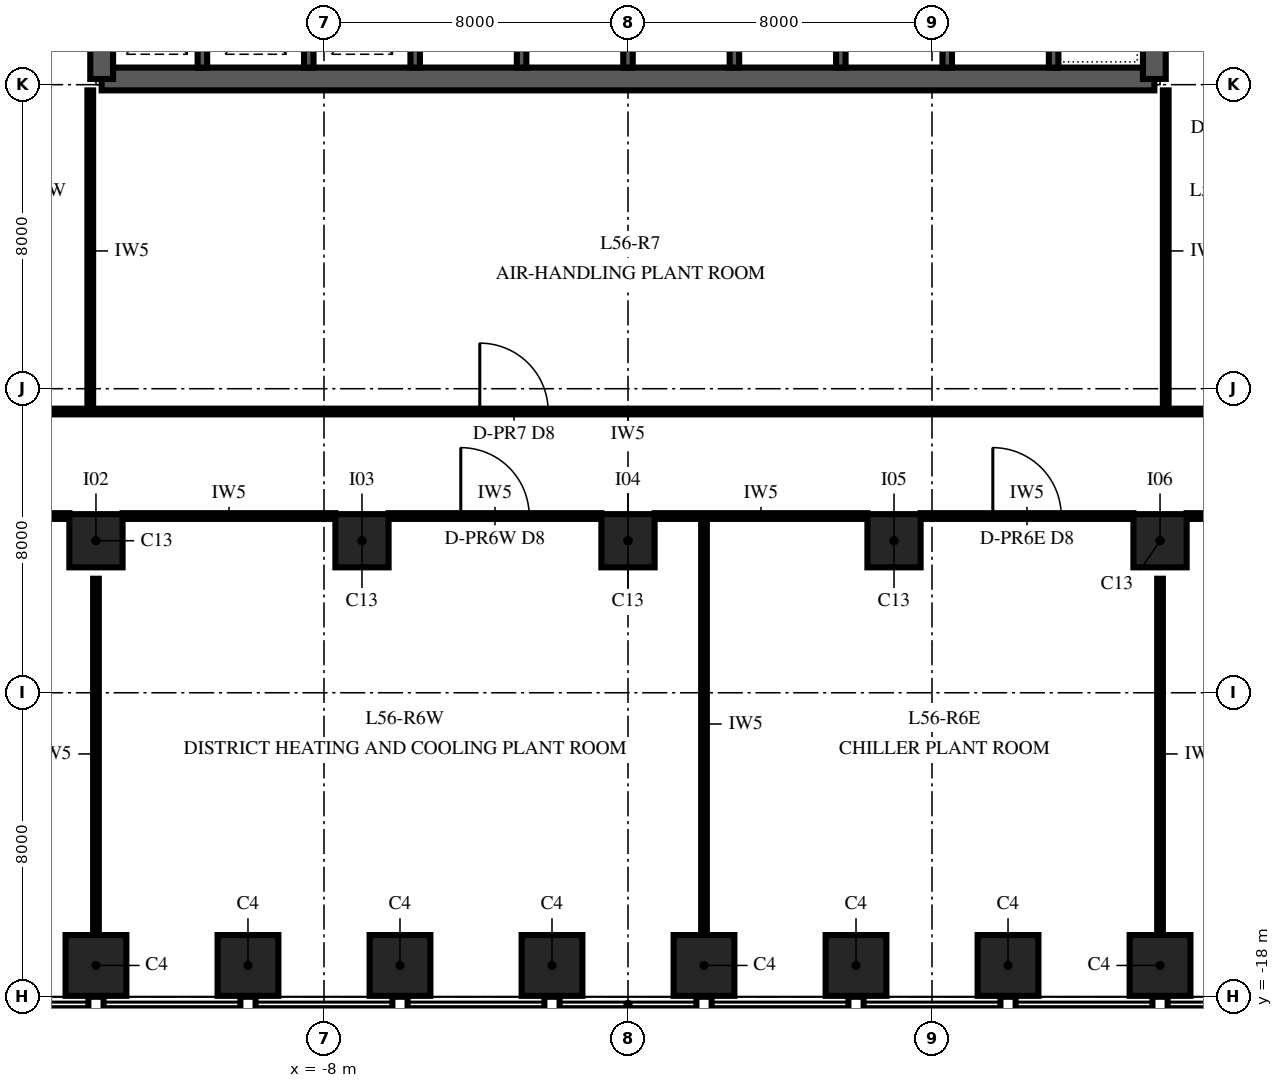
"""IFC4 building model, lengths in metres.
Left out: names, types, materials, properties, quantities, classifications, styles, units other than length and angle.
Written with IfcOpenShell. Run it as: python <this file> out.ifc"""

import sys

from ifc_helpers import new_model, si_unit, direction, frame, frame_2d, origin, origin_2d, place, context, subcontext, project, spatial, polyline, rectangle, outline, extrude, element, fill, save


model = new_model("IFC4")
c1 = context("Model", 3, precision=1e-05, world=origin(), true_north=direction((0.0, 1.0)))
c2 = subcontext(c1, "Body", "Model", "MODEL_VIEW")
j1 = project(units=[si_unit("LENGTHUNIT", "METRE"), si_unit("PLANEANGLEUNIT", "RADIAN")], contexts=[c1])
p1 = place(None, origin())
s1 = spatial("IfcSite", under=j1, at=p1, CompositionType="ELEMENT")
p2 = place(p1, origin())
s2 = spatial("IfcBuilding", under=s1, at=p2, CompositionType="ELEMENT")
p3 = place(p2, frame((0.0, 0.0, 242.0)))
s3 = spatial("IfcBuildingStorey", under=s2, at=p3, CompositionType="ELEMENT", Elevation=242.0)
for number, where, z_axis, x_axis in (
    (1, (-14.0, -17.175, 0.0), (0.0, 0.0, 1.0), (1.0, 0.0, 0.0)),
    (2, (-10.0, -17.175, 0.0), (0.0, 0.0, 1.0), (1.0, 0.0, 0.0)),
    (3, (-6.0, -17.175, 0.0), (0.0, 0.0, 1.0), (1.0, 0.0, 0.0)),
    (4, (-2.0, -17.175, 0.0), (0.0, 0.0, 1.0), (1.0, 0.0, 0.0)),
    (5, (2.0, -17.175, 0.0), (0.0, 0.0, 1.0), (1.0, 0.0, 0.0)),
    (6, (6.0, -17.175, 0.0), (0.0, 0.0, 1.0), (1.0, 0.0, 0.0)),
    (7, (10.0, -17.175, 0.0), (0.0, 0.0, 1.0), (1.0, 0.0, 0.0)),
    (8, (14.0, -17.175, 0.0), (0.0, 0.0, 1.0), (1.0, 0.0, 0.0)),
):
    element("IfcColumn", number, at=place(p3, frame(where, z_axis=z_axis, x_axis=x_axis)), inside=s3, PredefinedType="COLUMN", context=c2, shape_type="SweptSolid", body=[
        extrude(rectangle(XDim=1.6, YDim=1.6, at=origin_2d()), origin(), (0.0, 0.0, 1.0), 6.0),
    ])
for number, where, z_axis, x_axis in (
    (9, (-14.0, -6.0, 0.0), (0.0, 0.0, 1.0), (1.0, 0.0, 0.0)),
    (10, (-7.0, -6.0, 0.0), (0.0, 0.0, 1.0), (1.0, 0.0, 0.0)),
    (11, (0.0, -6.0, 0.0), (0.0, 0.0, 1.0), (1.0, 0.0, 0.0)),
    (12, (7.0, -6.0, 0.0), (0.0, 0.0, 1.0), (1.0, 0.0, 0.0)),
    (13, (14.0, -6.0, 0.0), (0.0, 0.0, 1.0), (1.0, 0.0, 0.0)),
):
    element("IfcColumn", number, at=place(p3, frame(where, z_axis=z_axis, x_axis=x_axis)), inside=s3, PredefinedType="COLUMN", context=c2, shape_type="SweptSolid", body=[
        extrude(rectangle(XDim=1.4, YDim=1.4, at=origin_2d()), origin(), (0.0, 0.0, 1.0), 6.0),
    ])
p4 = place(p3, frame((-13.85, 6.15, 0.0), z_axis=(0.0, 0.0, 1.0), x_axis=(1.0, 0.0, 0.0)))
e14 = element("IfcWall", 14, at=p4, inside=s3, PredefinedType="SHEAR", context=c2, shape_type="SweptSolid", body=[
    extrude(rectangle(XDim=27.7, YDim=0.6, at=frame_2d((13.85, 0.0))), origin(), (0.0, 0.0, 1.0), 6.0),
])
for number, where, z_axis, x_axis in (
    (15, (13.85, 6.15, 0.0), (0.0, 0.0, 1.0), (0.0, 1.0, 0.0)),
    (16, (-13.85, 23.85, 0.0), (0.0, 0.0, 1.0), (0.0, -1.0, 0.0)),
):
    element("IfcWall", number, at=place(p3, frame(where, z_axis=z_axis, x_axis=x_axis)), inside=s3, PredefinedType="SHEAR", context=c2, shape_type="SweptSolid", body=[
        extrude(outline(polyline([(0.0, -0.3), (17.7, -0.3), (17.7, 0.0), (17.4, 0.0), (17.4, 0.3), (0.3, 0.3), (0.3, 0.0), (0.0, 0.0), (0.0, -0.3)])), origin(), (0.0, 0.0, 1.0), 6.0),
    ])
for number, where, z_axis, x_axis in (
    (17, (-11.2, 6.45, 0.0), (0.0, 0.0, 1.0), (0.0, 1.0, 0.0)),
    (18, (-8.4, 6.45, 0.0), (0.0, 0.0, 1.0), (0.0, 1.0, 0.0)),
    (19, (-5.6, 6.45, 0.0), (0.0, 0.0, 1.0), (0.0, 1.0, 0.0)),
    (20, (-2.8, 6.45, 0.0), (0.0, 0.0, 1.0), (0.0, 1.0, 0.0)),
    (21, (0.0, 6.45, 0.0), (0.0, 0.0, 1.0), (0.0, 1.0, 0.0)),
    (22, (2.8, 6.45, 0.0), (0.0, 0.0, 1.0), (0.0, 1.0, 0.0)),
    (23, (5.6, 6.45, 0.0), (0.0, 0.0, 1.0), (0.0, 1.0, 0.0)),
    (24, (8.4, 6.45, 0.0), (0.0, 0.0, 1.0), (0.0, 1.0, 0.0)),
    (25, (11.2, 6.45, 0.0), (0.0, 0.0, 1.0), (0.0, 1.0, 0.0)),
):
    element("IfcWall", number, at=place(p3, frame(where, z_axis=z_axis, x_axis=x_axis)), inside=s3, PredefinedType="SHEAR", context=c2, shape_type="SweptSolid", body=[
        extrude(rectangle(XDim=2.825, YDim=0.25, at=frame_2d((1.413, 0.0))), origin(), (0.0, 0.0, 1.0), 6.0),
    ])
p5 = place(p3, frame((14.15, -2.6, 0.0), z_axis=(0.0, 0.0, 1.0), x_axis=(0.0, 1.0, 0.0)))
e26 = element("IfcWall", 26, at=p5, inside=s3, PredefinedType="PARTITIONING", context=c2, shape_type="SweptSolid", body=[
    extrude(rectangle(XDim=8.45, YDim=0.15, at=frame_2d((4.225, 0.0))), origin(), (0.0, 0.0, 1.0), 5.85),
])
p6 = place(p3, frame((14.0, -7.0, 0.0), z_axis=(0.0, 0.0, 1.0), x_axis=(0.0, -1.0, 0.0)))
e27 = element("IfcWall", 27, at=p6, inside=s3, PredefinedType="PARTITIONING", context=c2, shape_type="SweptSolid", body=[
    extrude(rectangle(XDim=9.22, YDim=0.15, at=frame_2d((4.61, 0.0))), origin(), (0.0, 0.0, 1.0), 5.25),
])
p7 = place(p3, frame((-14.15, -2.6, 0.0), z_axis=(0.0, 0.0, 1.0), x_axis=(0.0, 1.0, 0.0)))
e28 = element("IfcWall", 28, at=p7, inside=s3, PredefinedType="PARTITIONING", context=c2, shape_type="SweptSolid", body=[
    extrude(rectangle(XDim=8.45, YDim=0.15, at=frame_2d((4.225, 0.0))), origin(), (0.0, 0.0, 1.0), 5.85),
])
p8 = place(p3, frame((-14.0, -7.0, 0.0), z_axis=(0.0, 0.0, 1.0), x_axis=(0.0, -1.0, 0.0)))
e29 = element("IfcWall", 29, at=p8, inside=s3, PredefinedType="PARTITIONING", context=c2, shape_type="SweptSolid", body=[
    extrude(rectangle(XDim=9.22, YDim=0.15, at=frame_2d((4.61, 0.0))), origin(), (0.0, 0.0, 1.0), 5.25),
])
p9 = place(p3, frame((-20.3, -5.35, 0.0), z_axis=(0.0, 0.0, 1.0), x_axis=(1.0, 0.0, 0.0)))
e30 = element("IfcWall", 30, at=p9, inside=s3, PredefinedType="PARTITIONING", context=c2, shape_type="SweptSolid", body=[
    extrude(rectangle(XDim=5.6, YDim=0.15, at=frame_2d((2.8, 0.0))), origin(), (0.0, 0.0, 1.0), 5.85),
])
p10 = place(p9, frame((1.9, 0.0, 0.0)))
e31 = element("IfcOpeningElement", 31, at=p10, cuts=e30, PredefinedType="OPENING", context=c2, shape_type="SweptSolid", body=[
    extrude(rectangle(XDim=1.8, YDim=2.4, at=frame_2d((0.9, 1.2))), frame((0.0, 0.09, 0.0), z_axis=(0.0, -1.0, 0.0), x_axis=(1.0, 0.0, 0.0)), (0.0, 0.0, 1.0), 0.18),
])
p11 = place(p3, frame((-13.3, -5.35, 0.0), z_axis=(0.0, 0.0, 1.0), x_axis=(1.0, 0.0, 0.0)))
e32 = element("IfcWall", 32, at=p11, inside=s3, PredefinedType="PARTITIONING", context=c2, shape_type="SweptSolid", body=[
    extrude(rectangle(XDim=5.6, YDim=0.15, at=frame_2d((2.8, 0.0))), origin(), (0.0, 0.0, 1.0), 5.85),
])
p12 = place(p3, frame((-6.3, -5.35, 0.0), z_axis=(0.0, 0.0, 1.0), x_axis=(1.0, 0.0, 0.0)))
e33 = element("IfcWall", 33, at=p12, inside=s3, PredefinedType="PARTITIONING", context=c2, shape_type="SweptSolid", body=[
    extrude(rectangle(XDim=5.6, YDim=0.15, at=frame_2d((2.8, 0.0))), origin(), (0.0, 0.0, 1.0), 5.85),
])
p13 = place(p12, frame((1.9, 0.0, 0.0)))
e34 = element("IfcOpeningElement", 34, at=p13, cuts=e33, PredefinedType="OPENING", context=c2, shape_type="SweptSolid", body=[
    extrude(rectangle(XDim=1.8, YDim=2.4, at=frame_2d((0.9, 1.2))), frame((0.0, 0.09, 0.0), z_axis=(0.0, -1.0, 0.0), x_axis=(1.0, 0.0, 0.0)), (0.0, 0.0, 1.0), 0.18),
])
p14 = place(p3, frame((0.7, -5.35, 0.0), z_axis=(0.0, 0.0, 1.0), x_axis=(1.0, 0.0, 0.0)))
e35 = element("IfcWall", 35, at=p14, inside=s3, PredefinedType="PARTITIONING", context=c2, shape_type="SweptSolid", body=[
    extrude(rectangle(XDim=5.6, YDim=0.15, at=frame_2d((2.8, 0.0))), origin(), (0.0, 0.0, 1.0), 5.85),
])
p15 = place(p3, frame((7.7, -5.35, 0.0), z_axis=(0.0, 0.0, 1.0), x_axis=(1.0, 0.0, 0.0)))
e36 = element("IfcWall", 36, at=p15, inside=s3, PredefinedType="PARTITIONING", context=c2, shape_type="SweptSolid", body=[
    extrude(rectangle(XDim=5.6, YDim=0.15, at=frame_2d((2.8, 0.0))), origin(), (0.0, 0.0, 1.0), 5.85),
])
p16 = place(p15, frame((1.9, 0.0, 0.0)))
e37 = element("IfcOpeningElement", 37, at=p16, cuts=e36, PredefinedType="OPENING", context=c2, shape_type="SweptSolid", body=[
    extrude(rectangle(XDim=1.8, YDim=2.4, at=frame_2d((0.9, 1.2))), frame((0.0, 0.09, 0.0), z_axis=(0.0, -1.0, 0.0), x_axis=(1.0, 0.0, 0.0)), (0.0, 0.0, 1.0), 0.18),
])
p17 = place(p3, frame((14.7, -5.35, 0.0), z_axis=(0.0, 0.0, 1.0), x_axis=(1.0, 0.0, 0.0)))
e38 = element("IfcWall", 38, at=p17, inside=s3, PredefinedType="PARTITIONING", context=c2, shape_type="SweptSolid", body=[
    extrude(rectangle(XDim=5.6, YDim=0.15, at=frame_2d((2.8, 0.0))), origin(), (0.0, 0.0, 1.0), 5.85),
])
p18 = place(p17, frame((1.9, 0.0, 0.0)))
e39 = element("IfcOpeningElement", 39, at=p18, cuts=e38, PredefinedType="OPENING", context=c2, shape_type="SweptSolid", body=[
    extrude(rectangle(XDim=1.8, YDim=2.4, at=frame_2d((0.9, 1.2))), frame((0.0, 0.09, 0.0), z_axis=(0.0, -1.0, 0.0), x_axis=(1.0, 0.0, 0.0)), (0.0, 0.0, 1.0), 0.18),
])
p19 = place(p3, frame((-17.6, -2.6, 0.0), z_axis=(0.0, 0.0, 1.0), x_axis=(1.0, 0.0, 0.0)))
e40 = element("IfcWall", 40, at=p19, inside=s3, PredefinedType="PARTITIONING", context=c2, shape_type="SweptSolid", body=[
    extrude(rectangle(XDim=35.2, YDim=0.15, at=frame_2d((17.6, 0.0))), origin(), (0.0, 0.0, 1.0), 5.85),
])
p20 = place(p19, frame((13.7, 0.0, 0.0)))
e41 = element("IfcOpeningElement", 41, at=p20, cuts=e40, PredefinedType="OPENING", context=c2, shape_type="SweptSolid", body=[
    extrude(rectangle(XDim=1.8, YDim=2.4, at=frame_2d((0.9, 1.2))), frame((0.0, 0.09, 0.0), z_axis=(0.0, -1.0, 0.0), x_axis=(1.0, 0.0, 0.0)), (0.0, 0.0, 1.0), 0.18),
])
p21 = place(p3, frame((2.0, -5.425, 0.0), z_axis=(0.0, 0.0, 1.0), x_axis=(0.0, -1.0, 0.0)))
e42 = element("IfcWall", 42, at=p21, inside=s3, PredefinedType="PARTITIONING", context=c2, shape_type="SweptSolid", body=[
    extrude(rectangle(XDim=10.795, YDim=0.15, at=frame_2d((5.397, 0.0))), origin(), (0.0, 0.0, 1.0), 5.25),
])
p22 = place(p13, origin())
e43 = element("IfcDoor", 43, at=p22, inside=s3, OperationType="DOUBLE_DOOR_SINGLE_SWING", PredefinedType="DOOR", context=c2, shape_type="SweptSolid", body=[
    extrude(rectangle(XDim=1.8, YDim=2.4, at=frame_2d((0.9, 1.2))), frame((0.0, 0.075, 0.0), z_axis=(0.0, -1.0, 0.0), x_axis=(1.0, 0.0, 0.0)), (0.0, 0.0, 1.0), 0.149),
])
fill(e34, e43)
p23 = place(p16, origin())
e44 = element("IfcDoor", 44, at=p23, inside=s3, OperationType="DOUBLE_DOOR_SINGLE_SWING", PredefinedType="DOOR", context=c2, shape_type="SweptSolid", body=[
    extrude(rectangle(XDim=1.8, YDim=2.4, at=frame_2d((0.9, 1.2))), frame((0.0, 0.075, 0.0), z_axis=(0.0, -1.0, 0.0), x_axis=(1.0, 0.0, 0.0)), (0.0, 0.0, 1.0), 0.149),
])
fill(e37, e44)
p24 = place(p20, origin())
e45 = element("IfcDoor", 45, at=p24, inside=s3, OperationType="DOUBLE_DOOR_SINGLE_SWING", PredefinedType="DOOR", context=c2, shape_type="SweptSolid", body=[
    extrude(rectangle(XDim=1.8, YDim=2.4, at=frame_2d((0.9, 1.2))), frame((0.0, 0.075, 0.0), z_axis=(0.0, -1.0, 0.0), x_axis=(1.0, 0.0, 0.0)), (0.0, 0.0, 1.0), 0.149),
])
fill(e41, e45)
save(model, sys.argv[1])
